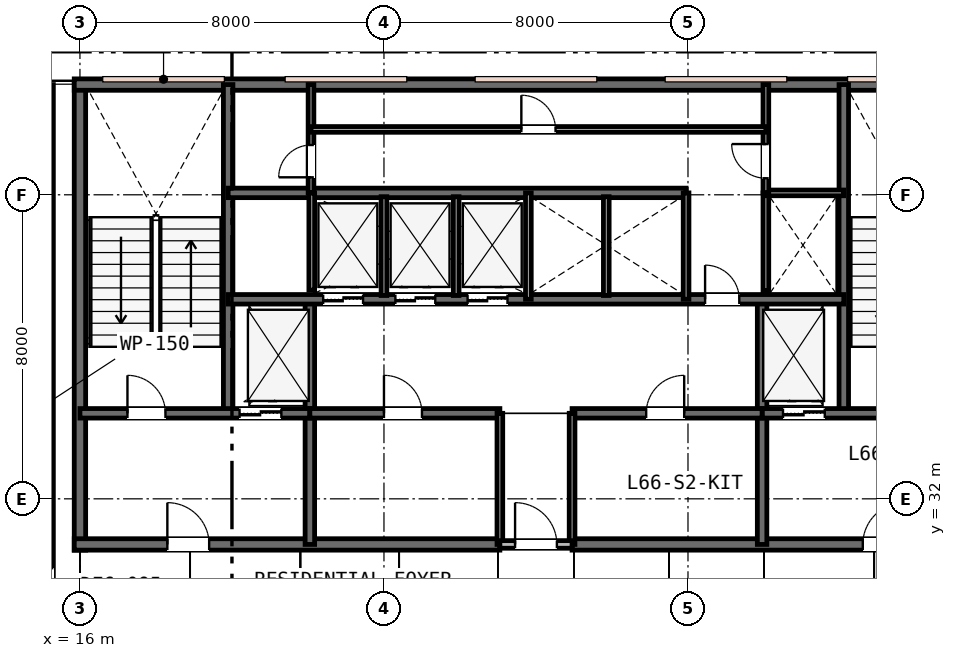
"""IFC4 building model, lengths in metres.
Left out: names, types, materials, properties, quantities, classifications, styles, units other than length and angle.
Written with IfcOpenShell. Run it as: python <this file> out.ifc"""

import sys

from ifc_helpers import new_model, si_unit, direction, frame, frame_2d, origin, place, context, subcontext, project, spatial, rectangle, extrude, element, fill, save


model = new_model("IFC4")
c1 = context("Model", 3, precision=1e-05, world=origin(), true_north=direction((0.0, 1.0)))
c2 = subcontext(c1, "Body", "Model", "MODEL_VIEW")
j1 = project(units=[si_unit("LENGTHUNIT", "METRE"), si_unit("PLANEANGLEUNIT", "RADIAN")], contexts=[c1])
p1 = place(None, origin())
s1 = spatial("IfcSite", under=j1, at=p1, CompositionType="ELEMENT")
p2 = place(p1, origin())
s2 = spatial("IfcBuilding", under=s1, at=p2, CompositionType="ELEMENT")
p3 = place(p2, frame((0.0, 0.0, 256.4)))
s3 = spatial("IfcBuildingStorey", under=s2, at=p3, CompositionType="ELEMENT", Elevation=256.4)
p4 = place(p3, frame((16.0, 30.65, 0.0), z_axis=(0.0, 0.0, 1.0), x_axis=(0.0, 1.0, 0.0)))
e1 = element("IfcWall", 1, at=p4, inside=s3, PredefinedType="SHEAR", context=c2, shape_type="SweptSolid", body=[
    extrude(rectangle(XDim=12.3, YDim=0.3, at=frame_2d((6.15, 0.0))), origin(), (0.0, 0.0, 1.0), 3.8),
])
p5 = place(p3, frame((15.85, 42.9, 0.0), z_axis=(0.0, 0.0, 1.0), x_axis=(1.0, 0.0, 0.0)))
e2 = element("IfcWall", 2, at=p5, inside=s3, PredefinedType="SHEAR", context=c2, shape_type="SweptSolid", body=[
    extrude(rectangle(XDim=24.3, YDim=0.3, at=frame_2d((12.15, 0.0))), origin(), (0.0, 0.0, 1.0), 3.8),
])
p6 = place(p3, frame((15.85, 30.8, 0.0), z_axis=(0.0, 0.0, 1.0), x_axis=(1.0, 0.0, 0.0)))
e3 = element("IfcWall", 3, at=p6, inside=s3, PredefinedType="SHEAR", context=c2, shape_type="SweptSolid", body=[
    extrude(rectangle(XDim=11.2, YDim=0.3, at=frame_2d((5.6, 0.0))), origin(), (0.0, 0.0, 1.0), 3.8),
])
p7 = place(p6, frame((2.45, 0.0, 0.0)))
e4 = element("IfcOpeningElement", 4, at=p7, cuts=e3, PredefinedType="OPENING", context=c2, shape_type="SweptSolid", body=[
    extrude(rectangle(XDim=1.1, YDim=2.15, at=frame_2d((0.55, 1.075))), frame((0.0, 0.16, 0.0), z_axis=(0.0, -1.0, 0.0), x_axis=(1.0, 0.0, 0.0)), (0.0, 0.0, 1.0), 0.32),
])
p8 = place(p3, frame((28.95, 30.8, 0.0), z_axis=(0.0, 0.0, 1.0), x_axis=(1.0, 0.0, 0.0)))
e5 = element("IfcWall", 5, at=p8, inside=s3, PredefinedType="SHEAR", context=c2, shape_type="SweptSolid", body=[
    extrude(rectangle(XDim=11.2, YDim=0.3, at=frame_2d((5.6, 0.0))), origin(), (0.0, 0.0, 1.0), 3.8),
])
p9 = place(p8, frame((7.65, 0.0, 0.0)))
e6 = element("IfcOpeningElement", 6, at=p9, cuts=e5, PredefinedType="OPENING", context=c2, shape_type="SweptSolid", body=[
    extrude(rectangle(XDim=1.1, YDim=2.15, at=frame_2d((0.55, 1.075))), frame((0.0, 0.16, 0.0), z_axis=(0.0, -1.0, 0.0), x_axis=(1.0, 0.0, 0.0)), (0.0, 0.0, 1.0), 0.32),
])
for number, where, z_axis, x_axis in (
    (7, (19.9, 34.25, 0.0), (0.0, 0.0, 1.0), (0.0, 1.0, 0.0)),
    (8, (36.1, 34.25, 0.0), (0.0, 0.0, 1.0), (0.0, 1.0, 0.0)),
):
    element("IfcWall", number, at=place(p3, frame(where, z_axis=z_axis, x_axis=x_axis)), inside=s3, PredefinedType="SHEAR", context=c2, shape_type="SweptSolid", body=[
        extrude(rectangle(XDim=8.65, YDim=0.25, at=frame_2d((4.325, 0.0))), origin(), (0.0, 0.0, 1.0), 3.8),
    ])
for number, where, z_axis, x_axis in (
    (9, (22.05, 30.8, 0.0), (0.0, 0.0, 1.0), (0.0, 1.0, 0.0)),
    (10, (33.95, 30.8, 0.0), (0.0, 0.0, 1.0), (0.0, 1.0, 0.0)),
):
    element("IfcWall", number, at=place(p3, frame(where, z_axis=z_axis, x_axis=x_axis)), inside=s3, PredefinedType="SHEAR", context=c2, shape_type="SweptSolid", body=[
        extrude(rectangle(XDim=6.45, YDim=0.25, at=frame_2d((3.225, 0.0))), origin(), (0.0, 0.0, 1.0), 3.8),
    ])
p10 = place(p3, frame((16.0, 34.25, 0.0), z_axis=(0.0, 0.0, 1.0), x_axis=(1.0, 0.0, 0.0)))
e11 = element("IfcWall", 11, at=p10, inside=s3, PredefinedType="SHEAR", context=c2, shape_type="SweptSolid", body=[
    extrude(rectangle(XDim=6.05, YDim=0.25, at=frame_2d((3.025, 0.0))), origin(), (0.0, 0.0, 1.0), 3.8),
])
p11 = place(p10, frame((1.25, 0.0, 0.0)))
e12 = element("IfcOpeningElement", 12, at=p11, cuts=e11, PredefinedType="OPENING", context=c2, shape_type="SweptSolid", body=[
    extrude(rectangle(XDim=1.0, YDim=2.15, at=frame_2d((0.5, 1.075))), frame((0.0, 0.135, 0.0), z_axis=(0.0, -1.0, 0.0), x_axis=(1.0, 0.0, 0.0)), (0.0, 0.0, 1.0), 0.27),
])
p12 = place(p10, frame((4.2, 0.0, 0.0)))
e13 = element("IfcOpeningElement", 13, at=p12, cuts=e11, PredefinedType="OPENING", context=c2, shape_type="SweptSolid", body=[
    extrude(rectangle(XDim=1.1, YDim=2.15, at=frame_2d((0.55, 1.075))), frame((0.0, 0.135, 0.0), z_axis=(0.0, -1.0, 0.0), x_axis=(1.0, 0.0, 0.0)), (0.0, 0.0, 1.0), 0.27),
])
p13 = place(p3, frame((33.95, 34.25, 0.0), z_axis=(0.0, 0.0, 1.0), x_axis=(1.0, 0.0, 0.0)))
e14 = element("IfcWall", 14, at=p13, inside=s3, PredefinedType="SHEAR", context=c2, shape_type="SweptSolid", body=[
    extrude(rectangle(XDim=6.05, YDim=0.25, at=frame_2d((3.025, 0.0))), origin(), (0.0, 0.0, 1.0), 3.8),
])
p14 = place(p13, frame((3.7, 0.0, 0.0)))
e15 = element("IfcOpeningElement", 15, at=p14, cuts=e14, PredefinedType="OPENING", context=c2, shape_type="SweptSolid", body=[
    extrude(rectangle(XDim=1.0, YDim=2.15, at=frame_2d((0.5, 1.075))), frame((0.0, 0.135, 0.0), z_axis=(0.0, -1.0, 0.0), x_axis=(1.0, 0.0, 0.0)), (0.0, 0.0, 1.0), 0.27),
])
p15 = place(p13, frame((0.55, 0.0, 0.0)))
e16 = element("IfcOpeningElement", 16, at=p15, cuts=e14, PredefinedType="OPENING", context=c2, shape_type="SweptSolid", body=[
    extrude(rectangle(XDim=1.1, YDim=2.15, at=frame_2d((0.55, 1.075))), frame((0.0, 0.135, 0.0), z_axis=(0.0, -1.0, 0.0), x_axis=(1.0, 0.0, 0.0)), (0.0, 0.0, 1.0), 0.27),
])
p16 = place(p3, frame((22.05, 34.25, 0.0), z_axis=(0.0, 0.0, 1.0), x_axis=(1.0, 0.0, 0.0)))
e17 = element("IfcWall", 17, at=p16, inside=s3, PredefinedType="SHEAR", context=c2, shape_type="SweptSolid", body=[
    extrude(rectangle(XDim=5.0, YDim=0.25, at=frame_2d((2.5, 0.0))), origin(), (0.0, 0.0, 1.0), 3.8),
])
p17 = place(p16, frame((1.95, 0.0, 0.0)))
e18 = element("IfcOpeningElement", 18, at=p17, cuts=e17, PredefinedType="OPENING", context=c2, shape_type="SweptSolid", body=[
    extrude(rectangle(XDim=1.0, YDim=2.15, at=frame_2d((0.5, 1.075))), frame((0.0, 0.135, 0.0), z_axis=(0.0, -1.0, 0.0), x_axis=(1.0, 0.0, 0.0)), (0.0, 0.0, 1.0), 0.27),
])
p18 = place(p3, frame((28.95, 34.25, 0.0), z_axis=(0.0, 0.0, 1.0), x_axis=(1.0, 0.0, 0.0)))
e19 = element("IfcWall", 19, at=p18, inside=s3, PredefinedType="SHEAR", context=c2, shape_type="SweptSolid", body=[
    extrude(rectangle(XDim=5.0, YDim=0.25, at=frame_2d((2.5, 0.0))), origin(), (0.0, 0.0, 1.0), 3.8),
])
p19 = place(p18, frame((1.95, 0.0, 0.0)))
e20 = element("IfcOpeningElement", 20, at=p19, cuts=e19, PredefinedType="OPENING", context=c2, shape_type="SweptSolid", body=[
    extrude(rectangle(XDim=1.0, YDim=2.15, at=frame_2d((0.5, 1.075))), frame((0.0, 0.135, 0.0), z_axis=(0.0, -1.0, 0.0), x_axis=(1.0, 0.0, 0.0)), (0.0, 0.0, 1.0), 0.27),
])
p20 = place(p3, frame((19.9, 37.25, 0.0), z_axis=(0.0, 0.0, 1.0), x_axis=(1.0, 0.0, 0.0)))
e21 = element("IfcWall", 21, at=p20, inside=s3, PredefinedType="SHEAR", context=c2, shape_type="SweptSolid", body=[
    extrude(rectangle(XDim=16.2, YDim=0.25, at=frame_2d((8.1, 0.0))), origin(), (0.0, 0.0, 1.0), 3.8),
])
p21 = place(p20, frame((12.55, 0.0, 0.0)))
e22 = element("IfcOpeningElement", 22, at=p21, cuts=e21, PredefinedType="OPENING", context=c2, shape_type="SweptSolid", body=[
    extrude(rectangle(XDim=0.9, YDim=2.15, at=frame_2d((0.45, 1.075))), frame((0.0, 0.135, 0.0), z_axis=(0.0, -1.0, 0.0), x_axis=(1.0, 0.0, 0.0)), (0.0, 0.0, 1.0), 0.27),
])
p22 = place(p20, frame((2.5, 0.0, 0.0)))
e23 = element("IfcOpeningElement", 23, at=p22, cuts=e21, PredefinedType="OPENING", context=c2, shape_type="SweptSolid", body=[
    extrude(rectangle(XDim=1.05, YDim=2.15, at=frame_2d((0.525, 1.075))), frame((0.0, 0.135, 0.0), z_axis=(0.0, -1.0, 0.0), x_axis=(1.0, 0.0, 0.0)), (0.0, 0.0, 1.0), 0.27),
])
p23 = place(p20, frame((4.4, 0.0, 0.0)))
e24 = element("IfcOpeningElement", 24, at=p23, cuts=e21, PredefinedType="OPENING", context=c2, shape_type="SweptSolid", body=[
    extrude(rectangle(XDim=1.05, YDim=2.15, at=frame_2d((0.525, 1.075))), frame((0.0, 0.135, 0.0), z_axis=(0.0, -1.0, 0.0), x_axis=(1.0, 0.0, 0.0)), (0.0, 0.0, 1.0), 0.27),
])
p24 = place(p20, frame((6.3, 0.0, 0.0)))
e25 = element("IfcOpeningElement", 25, at=p24, cuts=e21, PredefinedType="OPENING", context=c2, shape_type="SweptSolid", body=[
    extrude(rectangle(XDim=1.05, YDim=2.15, at=frame_2d((0.525, 1.075))), frame((0.0, 0.135, 0.0), z_axis=(0.0, -1.0, 0.0), x_axis=(1.0, 0.0, 0.0)), (0.0, 0.0, 1.0), 0.27),
])
p25 = place(p3, frame((19.9, 40.05, 0.0), z_axis=(0.0, 0.0, 1.0), x_axis=(1.0, 0.0, 0.0)))
e26 = element("IfcWall", 26, at=p25, inside=s3, PredefinedType="SHEAR", context=c2, shape_type="SweptSolid", body=[
    extrude(rectangle(XDim=12.05, YDim=0.25, at=frame_2d((6.025, 0.0))), origin(), (0.0, 0.0, 1.0), 3.8),
])
for number, where, z_axis, x_axis in (
    (27, (27.05, 30.8, 0.0), (0.0, 0.0, 1.0), (0.0, 1.0, 0.0)),
    (28, (28.95, 30.8, 0.0), (0.0, 0.0, 1.0), (0.0, 1.0, 0.0)),
):
    element("IfcWall", number, at=place(p3, frame(where, z_axis=z_axis, x_axis=x_axis)), inside=s3, PredefinedType="PLUMBINGWALL", context=c2, shape_type="SweptSolid", body=[
        extrude(rectangle(XDim=3.45, YDim=0.15, at=frame_2d((1.725, 0.0))), origin(), (0.0, 0.0, 1.0), 3.28),
    ])
p26 = place(p3, frame((27.05, 30.8, 0.0), z_axis=(0.0, 0.0, 1.0), x_axis=(1.0, 0.0, 0.0)))
e29 = element("IfcWall", 29, at=p26, inside=s3, PredefinedType="PARTITIONING", context=c2, shape_type="SweptSolid", body=[
    extrude(rectangle(XDim=1.9, YDim=0.2, at=frame_2d((0.95, 0.0))), origin(), (0.0, 0.0, 1.0), 3.28),
])
p27 = place(p26, frame((0.4, 0.0, 0.0)))
e30 = element("IfcOpeningElement", 30, at=p27, cuts=e29, PredefinedType="OPENING", context=c2, shape_type="SweptSolid", body=[
    extrude(rectangle(XDim=1.1, YDim=2.15, at=frame_2d((0.55, 1.075))), frame((0.0, 0.11, 0.0), z_axis=(0.0, -1.0, 0.0), x_axis=(1.0, 0.0, 0.0)), (0.0, 0.0, 1.0), 0.22),
])
p28 = place(p3, frame((22.1, 37.49, 0.0), z_axis=(0.0, 0.0, 1.0), x_axis=(0.0, 1.0, 0.0)))
e31 = element("IfcWall", 31, at=p28, inside=s3, PredefinedType="PLUMBINGWALL", context=c2, shape_type="SweptSolid", body=[
    extrude(rectangle(XDim=2.56, YDim=0.15, at=frame_2d((1.28, 0.0))), origin(), (0.0, 0.0, 1.0), 3.53),
])
p29 = place(p3, frame((27.8, 37.25, 0.0), z_axis=(0.0, 0.0, 1.0), x_axis=(0.0, 1.0, 0.0)))
e32 = element("IfcWall", 32, at=p29, inside=s3, PredefinedType="PLUMBINGWALL", context=c2, shape_type="SweptSolid", body=[
    extrude(rectangle(XDim=2.8, YDim=0.15, at=frame_2d((1.4, 0.0))), origin(), (0.0, 0.0, 1.0), 3.53),
])
for number, where, z_axis, x_axis in (
    (33, (24.0, 37.35, 0.0), (0.0, 0.0, 1.0), (0.0, 1.0, 0.0)),
    (34, (25.9, 37.35, 0.0), (0.0, 0.0, 1.0), (0.0, 1.0, 0.0)),
):
    element("IfcWall", number, at=place(p3, frame(where, z_axis=z_axis, x_axis=x_axis)), inside=s3, PredefinedType="PLUMBINGWALL", context=c2, shape_type="SweptSolid", body=[
        extrude(rectangle(XDim=2.6, YDim=0.15, at=frame_2d((1.3, 0.0))), origin(), (0.0, 0.0, 1.0), 3.53),
    ])
p30 = place(p3, frame((31.95, 37.25, 0.0), z_axis=(0.0, 0.0, 1.0), x_axis=(0.0, 1.0, 0.0)))
e35 = element("IfcWall", 35, at=p30, inside=s3, PredefinedType="PLUMBINGWALL", context=c2, shape_type="SweptSolid", body=[
    extrude(rectangle(XDim=2.8, YDim=0.15, at=frame_2d((1.4, 0.0))), origin(), (0.0, 0.0, 1.0), 3.53),
])
p31 = place(p3, frame((29.85, 37.35, 0.0), z_axis=(0.0, 0.0, 1.0), x_axis=(0.0, 1.0, 0.0)))
e36 = element("IfcWall", 36, at=p31, inside=s3, PredefinedType="PLUMBINGWALL", context=c2, shape_type="SweptSolid", body=[
    extrude(rectangle(XDim=2.6, YDim=0.15, at=frame_2d((1.3, 0.0))), origin(), (0.0, 0.0, 1.0), 3.53),
])
p32 = place(p3, frame((34.05, 37.473, 0.0), z_axis=(0.0, 0.0, 1.0), x_axis=(0.0, 1.0, 0.0)))
e37 = element("IfcWall", 37, at=p32, inside=s3, PredefinedType="PLUMBINGWALL", context=c2, shape_type="SweptSolid", body=[
    extrude(rectangle(XDim=2.577, YDim=0.15, at=frame_2d((1.288, 0.0))), origin(), (0.0, 0.0, 1.0), 3.53),
])
p33 = place(p3, frame((34.05, 40.05, 0.0), z_axis=(0.0, 0.0, 1.0), x_axis=(1.0, 0.0, 0.0)))
e38 = element("IfcWall", 38, at=p33, inside=s3, PredefinedType="PARTITIONING", context=c2, shape_type="SweptSolid", body=[
    extrude(rectangle(XDim=2.05, YDim=0.15, at=frame_2d((1.025, 0.0))), origin(), (0.0, 0.0, 1.0), 3.53),
])
p34 = place(p3, frame((34.05, 40.05, 0.0), z_axis=(0.0, 0.0, 1.0), x_axis=(0.0, 1.0, 0.0)))
e39 = element("IfcWall", 39, at=p34, inside=s3, PredefinedType="PARTITIONING", context=c2, shape_type="SweptSolid", body=[
    extrude(rectangle(XDim=2.85, YDim=0.15, at=frame_2d((1.425, 0.0))), origin(), (0.0, 0.0, 1.0), 3.53),
])
p35 = place(p34, frame((0.385, 0.0, 0.0)))
e40 = element("IfcOpeningElement", 40, at=p35, cuts=e39, PredefinedType="OPENING", context=c2, shape_type="SweptSolid", body=[
    extrude(rectangle(XDim=0.9, YDim=2.15, at=frame_2d((0.45, 1.075))), frame((0.0, 0.085, 0.0), z_axis=(0.0, -1.0, 0.0), x_axis=(1.0, 0.0, 0.0)), (0.0, 0.0, 1.0), 0.17),
])
p36 = place(p3, frame((22.08, 40.05, 0.0), z_axis=(0.0, 0.0, 1.0), x_axis=(0.0, 1.0, 0.0)))
e41 = element("IfcWall", 41, at=p36, inside=s3, PredefinedType="PARTITIONING", context=c2, shape_type="SweptSolid", body=[
    extrude(rectangle(XDim=2.85, YDim=0.15, at=frame_2d((1.425, 0.0))), origin(), (0.0, 0.0, 1.0), 3.53),
])
p37 = place(p36, frame((0.41, 0.0, 0.0)))
e42 = element("IfcOpeningElement", 42, at=p37, cuts=e41, PredefinedType="OPENING", context=c2, shape_type="SweptSolid", body=[
    extrude(rectangle(XDim=0.85, YDim=2.15, at=frame_2d((0.425, 1.075))), frame((0.0, 0.085, 0.0), z_axis=(0.0, -1.0, 0.0), x_axis=(1.0, 0.0, 0.0)), (0.0, 0.0, 1.0), 0.17),
])
p38 = place(p3, frame((22.08, 41.72, 0.0), z_axis=(0.0, 0.0, 1.0), x_axis=(1.0, 0.0, 0.0)))
e43 = element("IfcWall", 43, at=p38, inside=s3, PredefinedType="PARTITIONING", context=c2, shape_type="SweptSolid", body=[
    extrude(rectangle(XDim=11.97, YDim=0.15, at=frame_2d((5.985, 0.0))), origin(), (0.0, 0.0, 1.0), 3.53),
])
p39 = place(p38, frame((5.535, 0.0, 0.0)))
e44 = element("IfcOpeningElement", 44, at=p39, cuts=e43, PredefinedType="OPENING", context=c2, shape_type="SweptSolid", body=[
    extrude(rectangle(XDim=0.9, YDim=2.15, at=frame_2d((0.45, 1.075))), frame((0.0, 0.085, 0.0), z_axis=(0.0, -1.0, 0.0), x_axis=(1.0, 0.0, 0.0)), (0.0, 0.0, 1.0), 0.17),
])
p40 = place(p3, frame((15.2, 28.6, 0.0), z_axis=(0.0, 0.0, 1.0), x_axis=(0.0, 1.0, 0.0)))
e45 = element("IfcWall", 45, at=p40, inside=s3, PredefinedType="PARTITIONING", context=c2, shape_type="SweptSolid", body=[
    extrude(rectangle(XDim=14.3, YDim=0.2, at=frame_2d((7.15, 0.0))), origin(), (0.0, 0.0, 1.0), 3.16),
])
p41 = place(p40, frame((0.625, 0.0, 0.0)))
e46 = element("IfcOpeningElement", 46, at=p41, cuts=e45, PredefinedType="OPENING", context=c2, shape_type="SweptSolid", body=[
    extrude(rectangle(XDim=0.95, YDim=2.15, at=frame_2d((0.475, 1.075))), frame((0.0, 0.11, 0.0), z_axis=(0.0, -1.0, 0.0), x_axis=(1.0, 0.0, 0.0)), (0.0, 0.0, 1.0), 0.22),
])
p42 = place(p27, origin())
e47 = element("IfcDoor", 47, at=p42, inside=s3, OperationType="SINGLE_SWING_LEFT", PredefinedType="DOOR", context=c2, shape_type="SweptSolid", body=[
    extrude(rectangle(XDim=1.1, YDim=2.15, at=frame_2d((0.55, 1.075))), frame((0.0, 0.025, 0.0), z_axis=(0.0, -1.0, 0.0), x_axis=(1.0, 0.0, 0.0)), (0.0, 0.0, 1.0), 0.05),
])
fill(e30, e47)
p43 = place(p11, origin())
e48 = element("IfcDoor", 48, at=p43, inside=s3, OperationType="SINGLE_SWING_LEFT", PredefinedType="DOOR", context=c2, shape_type="SweptSolid", body=[
    extrude(rectangle(XDim=1.0, YDim=2.15, at=frame_2d((0.5, 1.075))), frame((0.0, 0.025, 0.0), z_axis=(0.0, -1.0, 0.0), x_axis=(1.0, 0.0, 0.0)), (0.0, 0.0, 1.0), 0.05),
])
fill(e12, e48)
p44 = place(p7, origin())
e49 = element("IfcDoor", 49, at=p44, inside=s3, OperationType="SINGLE_SWING_LEFT", PredefinedType="DOOR", context=c2, shape_type="SweptSolid", body=[
    extrude(rectangle(XDim=1.1, YDim=2.15, at=frame_2d((0.55, 1.075))), frame((0.0, 0.025, 0.0), z_axis=(0.0, -1.0, 0.0), x_axis=(1.0, 0.0, 0.0)), (0.0, 0.0, 1.0), 0.05),
])
fill(e4, e49)
p45 = place(p9, origin())
e50 = element("IfcDoor", 50, at=p45, inside=s3, OperationType="SINGLE_SWING_RIGHT", PredefinedType="DOOR", context=c2, shape_type="SweptSolid", body=[
    extrude(rectangle(XDim=1.1, YDim=2.15, at=frame_2d((0.55, 1.075))), frame((0.0, 0.025, 0.0), z_axis=(0.0, -1.0, 0.0), x_axis=(1.0, 0.0, 0.0)), (0.0, 0.0, 1.0), 0.05),
])
fill(e6, e50)
p46 = place(p17, origin())
e51 = element("IfcDoor", 51, at=p46, inside=s3, OperationType="SINGLE_SWING_LEFT", PredefinedType="DOOR", context=c2, shape_type="SweptSolid", body=[
    extrude(rectangle(XDim=1.0, YDim=2.15, at=frame_2d((0.5, 1.075))), frame((0.0, 0.025, 0.0), z_axis=(0.0, -1.0, 0.0), x_axis=(1.0, 0.0, 0.0)), (0.0, 0.0, 1.0), 0.05),
])
fill(e18, e51)
p47 = place(p19, origin())
e52 = element("IfcDoor", 52, at=p47, inside=s3, OperationType="SINGLE_SWING_RIGHT", PredefinedType="DOOR", context=c2, shape_type="SweptSolid", body=[
    extrude(rectangle(XDim=1.0, YDim=2.15, at=frame_2d((0.5, 1.075))), frame((0.0, 0.025, 0.0), z_axis=(0.0, -1.0, 0.0), x_axis=(1.0, 0.0, 0.0)), (0.0, 0.0, 1.0), 0.05),
])
fill(e20, e52)
p48 = place(p21, origin())
e53 = element("IfcDoor", 53, at=p48, inside=s3, OperationType="SINGLE_SWING_LEFT", PredefinedType="DOOR", context=c2, shape_type="SweptSolid", body=[
    extrude(rectangle(XDim=0.9, YDim=2.15, at=frame_2d((0.45, 1.075))), frame((0.0, 0.025, 0.0), z_axis=(0.0, -1.0, 0.0), x_axis=(1.0, 0.0, 0.0)), (0.0, 0.0, 1.0), 0.05),
])
fill(e22, e53)
p49 = place(p35, origin())
e54 = element("IfcDoor", 54, at=p49, inside=s3, OperationType="SINGLE_SWING_RIGHT", PredefinedType="DOOR", context=c2, shape_type="SweptSolid", body=[
    extrude(rectangle(XDim=0.9, YDim=2.15, at=frame_2d((0.45, 1.075))), frame((0.0, 0.025, 0.0), z_axis=(0.0, -1.0, 0.0), x_axis=(1.0, 0.0, 0.0)), (0.0, 0.0, 1.0), 0.05),
])
fill(e40, e54)
p50 = place(p37, origin())
e55 = element("IfcDoor", 55, at=p50, inside=s3, OperationType="SINGLE_SWING_LEFT", PredefinedType="DOOR", context=c2, shape_type="SweptSolid", body=[
    extrude(rectangle(XDim=0.85, YDim=2.15, at=frame_2d((0.425, 1.075))), frame((0.0, 0.025, 0.0), z_axis=(0.0, -1.0, 0.0), x_axis=(1.0, 0.0, 0.0)), (0.0, 0.0, 1.0), 0.05),
])
fill(e42, e55)
p51 = place(p39, origin())
e56 = element("IfcDoor", 56, at=p51, inside=s3, OperationType="SINGLE_SWING_LEFT", PredefinedType="DOOR", context=c2, shape_type="SweptSolid", body=[
    extrude(rectangle(XDim=0.9, YDim=2.15, at=frame_2d((0.45, 1.075))), frame((0.0, 0.025, 0.0), z_axis=(0.0, -1.0, 0.0), x_axis=(1.0, 0.0, 0.0)), (0.0, 0.0, 1.0), 0.05),
])
fill(e44, e56)
p52 = place(p12, origin())
e57 = element("IfcDoor", 57, at=p52, inside=s3, OperationType="DOUBLE_DOOR_SLIDING", PredefinedType="DOOR", context=c2, shape_type="SweptSolid", body=[
    extrude(rectangle(XDim=1.1, YDim=2.15, at=frame_2d((0.55, 1.075))), frame((0.0, 0.025, 0.0), z_axis=(0.0, -1.0, 0.0), x_axis=(1.0, 0.0, 0.0)), (0.0, 0.0, 1.0), 0.05),
])
fill(e13, e57)
p53 = place(p15, origin())
e58 = element("IfcDoor", 58, at=p53, inside=s3, OperationType="DOUBLE_DOOR_SLIDING", PredefinedType="DOOR", context=c2, shape_type="SweptSolid", body=[
    extrude(rectangle(XDim=1.1, YDim=2.15, at=frame_2d((0.55, 1.075))), frame((0.0, 0.025, 0.0), z_axis=(0.0, -1.0, 0.0), x_axis=(1.0, 0.0, 0.0)), (0.0, 0.0, 1.0), 0.05),
])
fill(e16, e58)
p54 = place(p22, origin())
e59 = element("IfcDoor", 59, at=p54, inside=s3, OperationType="DOUBLE_DOOR_SLIDING", PredefinedType="DOOR", context=c2, shape_type="SweptSolid", body=[
    extrude(rectangle(XDim=1.05, YDim=2.15, at=frame_2d((0.525, 1.075))), frame((0.0, 0.025, 0.0), z_axis=(0.0, -1.0, 0.0), x_axis=(1.0, 0.0, 0.0)), (0.0, 0.0, 1.0), 0.05),
])
fill(e23, e59)
p55 = place(p23, origin())
e60 = element("IfcDoor", 60, at=p55, inside=s3, OperationType="DOUBLE_DOOR_SLIDING", PredefinedType="DOOR", context=c2, shape_type="SweptSolid", body=[
    extrude(rectangle(XDim=1.05, YDim=2.15, at=frame_2d((0.525, 1.075))), frame((0.0, 0.025, 0.0), z_axis=(0.0, -1.0, 0.0), x_axis=(1.0, 0.0, 0.0)), (0.0, 0.0, 1.0), 0.05),
])
fill(e24, e60)
p56 = place(p24, origin())
e61 = element("IfcDoor", 61, at=p56, inside=s3, OperationType="DOUBLE_DOOR_SLIDING", PredefinedType="DOOR", context=c2, shape_type="SweptSolid", body=[
    extrude(rectangle(XDim=1.05, YDim=2.15, at=frame_2d((0.525, 1.075))), frame((0.0, 0.025, 0.0), z_axis=(0.0, -1.0, 0.0), x_axis=(1.0, 0.0, 0.0)), (0.0, 0.0, 1.0), 0.05),
])
fill(e25, e61)
save(model, sys.argv[1])
